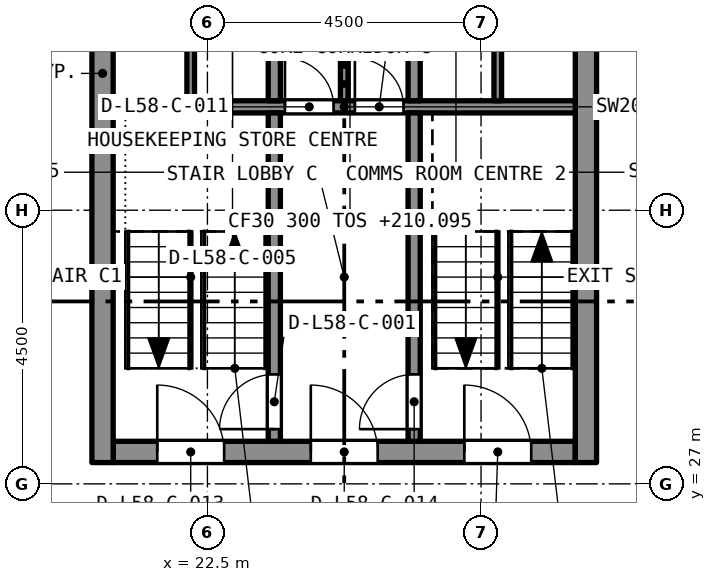
"""IFC4 building model, lengths in metres.
Left out: names, types, materials, properties, quantities, classifications, styles, units other than length and angle.
Written with IfcOpenShell. Run it as: python <this file> out.ifc"""

import sys

from ifc_helpers import new_model, si_unit, direction, frame, frame_2d, origin, place, context, subcontext, project, spatial, rectangle, extrude, element, fill, save


model = new_model("IFC4")
c1 = context("Model", 3, precision=1e-05, world=origin(), true_north=direction((0.0, 1.0)))
c2 = subcontext(c1, "Body", "Model", "MODEL_VIEW")
j1 = project(units=[si_unit("LENGTHUNIT", "METRE"), si_unit("PLANEANGLEUNIT", "RADIAN")], contexts=[c1])
p1 = place(None, origin())
s1 = spatial("IfcSite", under=j1, at=p1, CompositionType="ELEMENT")
p2 = place(p1, origin())
s2 = spatial("IfcBuilding", under=s1, at=p2, CompositionType="ELEMENT")
p3 = place(p2, frame((0.0, 0.0, 210.095)))
s3 = spatial("IfcBuildingStorey", under=s2, at=p3, CompositionType="ELEMENT", Elevation=210.095)
p4 = place(p3, frame((20.95, 27.525, 0.0), z_axis=(0.0, 0.0, 1.0), x_axis=(1.0, 0.0, 0.0)))
e1 = element("IfcWall", 1, at=p4, inside=s3, PredefinedType="SOLIDWALL", context=c2, shape_type="SweptSolid", body=[
    extrude(rectangle(XDim=7.6, YDim=0.35, at=frame_2d((3.8, 0.0))), origin(), (0.0, 0.0, 1.0), 3.2),
])
p5 = place(p4, frame((0.725, 0.0, 0.0)))
e2 = element("IfcOpeningElement", 2, at=p5, cuts=e1, PredefinedType="OPENING", context=c2, shape_type="SweptSolid", body=[
    extrude(rectangle(XDim=1.1, YDim=2.1, at=frame_2d((0.55, 1.05))), frame((0.0, 0.185, 0.0), z_axis=(0.0, -1.0, 0.0), x_axis=(1.0, 0.0, 0.0)), (0.0, 0.0, 1.0), 0.37),
])
p6 = place(p4, frame((3.25, 0.0, 0.0)))
e3 = element("IfcOpeningElement", 3, at=p6, cuts=e1, PredefinedType="OPENING", context=c2, shape_type="SweptSolid", body=[
    extrude(rectangle(XDim=1.1, YDim=2.1, at=frame_2d((0.55, 1.05))), frame((0.0, 0.185, 0.0), z_axis=(0.0, -1.0, 0.0), x_axis=(1.0, 0.0, 0.0)), (0.0, 0.0, 1.0), 0.37),
])
p7 = place(p4, frame((5.775, 0.0, 0.0)))
e4 = element("IfcOpeningElement", 4, at=p7, cuts=e1, PredefinedType="OPENING", context=c2, shape_type="SweptSolid", body=[
    extrude(rectangle(XDim=1.1, YDim=2.1, at=frame_2d((0.55, 1.05))), frame((0.0, 0.185, 0.0), z_axis=(0.0, -1.0, 0.0), x_axis=(1.0, 0.0, 0.0)), (0.0, 0.0, 1.0), 0.37),
])
p8 = place(p3, frame((20.775, 27.35, 0.0), z_axis=(0.0, 0.0, 1.0), x_axis=(0.0, 1.0, 0.0)))
e5 = element("IfcWall", 5, at=p8, inside=s3, PredefinedType="SOLIDWALL", context=c2, shape_type="SweptSolid", body=[
    extrude(rectangle(XDim=12.8, YDim=0.35, at=frame_2d((6.4, 0.0))), origin(), (0.0, 0.0, 1.0), 3.2),
])
p9 = place(p8, frame((8.6, 0.0, 0.0)))
e6 = element("IfcOpeningElement", 6, at=p9, cuts=e5, PredefinedType="OPENING", context=c2, shape_type="SweptSolid", body=[
    extrude(rectangle(XDim=1.2, YDim=2.1, at=frame_2d((0.6, 1.05))), frame((0.0, 0.185, 0.0), z_axis=(0.0, -1.0, 0.0), x_axis=(1.0, 0.0, 0.0)), (0.0, 0.0, 1.0), 0.37),
])
p10 = place(p3, frame((28.725, 27.35, 0.0), z_axis=(0.0, 0.0, 1.0), x_axis=(0.0, 1.0, 0.0)))
e7 = element("IfcWall", 7, at=p10, inside=s3, PredefinedType="SOLIDWALL", context=c2, shape_type="SweptSolid", body=[
    extrude(rectangle(XDim=12.8, YDim=0.35, at=frame_2d((6.4, 0.0))), origin(), (0.0, 0.0, 1.0), 3.2),
])
p11 = place(p10, frame((8.6, 0.0, 0.0)))
e8 = element("IfcOpeningElement", 8, at=p11, cuts=e7, PredefinedType="OPENING", context=c2, shape_type="SweptSolid", body=[
    extrude(rectangle(XDim=1.2, YDim=2.1, at=frame_2d((0.6, 1.05))), frame((0.0, 0.185, 0.0), z_axis=(0.0, -1.0, 0.0), x_axis=(1.0, 0.0, 0.0)), (0.0, 0.0, 1.0), 0.37),
])
p12 = place(p3, frame((20.95, 33.2, 0.0), z_axis=(0.0, 0.0, 1.0), x_axis=(1.0, 0.0, 0.0)))
e9 = element("IfcWall", 9, at=p12, inside=s3, PredefinedType="SOLIDWALL", context=c2, shape_type="SweptSolid", body=[
    extrude(rectangle(XDim=7.6, YDim=0.2, at=frame_2d((3.8, 0.0))), origin(), (0.0, 0.0, 1.0), 2.9),
])
p13 = place(p12, frame((2.825, 0.0, 0.0)))
e10 = element("IfcOpeningElement", 10, at=p13, cuts=e9, PredefinedType="OPENING", context=c2, shape_type="SweptSolid", body=[
    extrude(rectangle(XDim=0.8, YDim=2.1, at=frame_2d((0.4, 1.05))), frame((0.0, 0.11, 0.0), z_axis=(0.0, -1.0, 0.0), x_axis=(1.0, 0.0, 0.0)), (0.0, 0.0, 1.0), 0.22),
])
p14 = place(p12, frame((3.975, 0.0, 0.0)))
e11 = element("IfcOpeningElement", 11, at=p14, cuts=e9, PredefinedType="OPENING", context=c2, shape_type="SweptSolid", body=[
    extrude(rectangle(XDim=0.8, YDim=2.1, at=frame_2d((0.4, 1.05))), frame((0.0, 0.11, 0.0), z_axis=(0.0, -1.0, 0.0), x_axis=(1.0, 0.0, 0.0)), (0.0, 0.0, 1.0), 0.22),
])
p15 = place(p3, frame((23.6, 27.7, 0.0), z_axis=(0.0, 0.0, 1.0), x_axis=(0.0, 1.0, 0.0)))
e12 = element("IfcWall", 12, at=p15, inside=s3, PredefinedType="SOLIDWALL", context=c2, shape_type="SweptSolid", body=[
    extrude(rectangle(XDim=5.4, YDim=0.2, at=frame_2d((2.7, 0.0))), origin(), (0.0, 0.0, 1.0), 2.9),
])
p16 = place(p15, frame((0.2, 0.0, 0.0)))
e13 = element("IfcOpeningElement", 13, at=p16, cuts=e12, PredefinedType="OPENING", context=c2, shape_type="SweptSolid", body=[
    extrude(rectangle(XDim=0.9, YDim=2.1, at=frame_2d((0.45, 1.05))), frame((0.0, 0.11, 0.0), z_axis=(0.0, -1.0, 0.0), x_axis=(1.0, 0.0, 0.0)), (0.0, 0.0, 1.0), 0.22),
])
p17 = place(p3, frame((25.9, 27.7, 0.0), z_axis=(0.0, 0.0, 1.0), x_axis=(0.0, 1.0, 0.0)))
e14 = element("IfcWall", 14, at=p17, inside=s3, PredefinedType="SOLIDWALL", context=c2, shape_type="SweptSolid", body=[
    extrude(rectangle(XDim=5.4, YDim=0.2, at=frame_2d((2.7, 0.0))), origin(), (0.0, 0.0, 1.0), 2.9),
])
p18 = place(p17, frame((0.2, 0.0, 0.0)))
e15 = element("IfcOpeningElement", 15, at=p18, cuts=e14, PredefinedType="OPENING", context=c2, shape_type="SweptSolid", body=[
    extrude(rectangle(XDim=0.9, YDim=2.1, at=frame_2d((0.45, 1.05))), frame((0.0, 0.11, 0.0), z_axis=(0.0, -1.0, 0.0), x_axis=(1.0, 0.0, 0.0)), (0.0, 0.0, 1.0), 0.22),
])
for number, where, z_axis, x_axis in (
    (16, (23.6, 33.3, 0.0), (0.0, 0.0, 1.0), (0.0, 1.0, 0.0)),
    (17, (25.9, 33.3, 0.0), (0.0, 0.0, 1.0), (0.0, 1.0, 0.0)),
):
    element("IfcWall", number, at=place(p3, frame(where, z_axis=z_axis, x_axis=x_axis)), inside=s3, PredefinedType="SOLIDWALL", context=c2, shape_type="SweptSolid", body=[
        extrude(rectangle(XDim=2.3, YDim=0.2, at=frame_2d((1.15, 0.0))), origin(), (0.0, 0.0, 1.0), 2.9),
    ])
for number, where, z_axis, x_axis in (
    (18, (22.225, 33.3, 0.0), (0.0, 0.0, 1.0), (0.0, 1.0, 0.0)),
    (19, (27.275, 33.3, 0.0), (0.0, 0.0, 1.0), (0.0, 1.0, 0.0)),
    (20, (24.75, 33.3, 0.0), (0.0, 0.0, 1.0), (0.0, 1.0, 0.0)),
):
    element("IfcWall", number, at=place(p3, frame(where, z_axis=z_axis, x_axis=x_axis)), inside=s3, PredefinedType="PARTITIONING", context=c2, shape_type="SweptSolid", body=[
        extrude(rectangle(XDim=2.3, YDim=0.125, at=frame_2d((1.15, 0.0))), origin(), (0.0, 0.0, 1.0), 2.9),
    ])
p19 = place(p16, origin())
e21 = element("IfcDoor", 21, at=p19, inside=s3, OperationType="SINGLE_SWING_LEFT", PredefinedType="DOOR", context=c2, shape_type="SweptSolid", body=[
    extrude(rectangle(XDim=0.9, YDim=2.1, at=frame_2d((0.45, 1.05))), frame((0.0, 0.025, 0.0), z_axis=(0.0, -1.0, 0.0), x_axis=(1.0, 0.0, 0.0)), (0.0, 0.0, 1.0), 0.05),
])
fill(e13, e21)
p20 = place(p18, origin())
e22 = element("IfcDoor", 22, at=p20, inside=s3, OperationType="SINGLE_SWING_LEFT", PredefinedType="DOOR", context=c2, shape_type="SweptSolid", body=[
    extrude(rectangle(XDim=0.9, YDim=2.1, at=frame_2d((0.45, 1.05))), frame((0.0, 0.025, 0.0), z_axis=(0.0, -1.0, 0.0), x_axis=(1.0, 0.0, 0.0)), (0.0, 0.0, 1.0), 0.05),
])
fill(e15, e22)
p21 = place(p13, origin())
e23 = element("IfcDoor", 23, at=p21, inside=s3, OperationType="SINGLE_SWING_LEFT", PredefinedType="DOOR", context=c2, shape_type="SweptSolid", body=[
    extrude(rectangle(XDim=0.8, YDim=2.1, at=frame_2d((0.4, 1.05))), frame((0.0, 0.025, 0.0), z_axis=(0.0, -1.0, 0.0), x_axis=(1.0, 0.0, 0.0)), (0.0, 0.0, 1.0), 0.05),
])
fill(e10, e23)
p22 = place(p14, origin())
e24 = element("IfcDoor", 24, at=p22, inside=s3, OperationType="SINGLE_SWING_LEFT", PredefinedType="DOOR", context=c2, shape_type="SweptSolid", body=[
    extrude(rectangle(XDim=0.8, YDim=2.1, at=frame_2d((0.4, 1.05))), frame((0.0, 0.025, 0.0), z_axis=(0.0, -1.0, 0.0), x_axis=(1.0, 0.0, 0.0)), (0.0, 0.0, 1.0), 0.05),
])
fill(e11, e24)
p23 = place(p5, origin())
e25 = element("IfcDoor", 25, at=p23, inside=s3, OperationType="SINGLE_SWING_LEFT", PredefinedType="DOOR", context=c2, shape_type="SweptSolid", body=[
    extrude(rectangle(XDim=1.1, YDim=2.1, at=frame_2d((0.55, 1.05))), frame((0.0, 0.025, 0.0), z_axis=(0.0, -1.0, 0.0), x_axis=(1.0, 0.0, 0.0)), (0.0, 0.0, 1.0), 0.05),
])
fill(e2, e25)
p24 = place(p6, origin())
e26 = element("IfcDoor", 26, at=p24, inside=s3, OperationType="SINGLE_SWING_LEFT", PredefinedType="DOOR", context=c2, shape_type="SweptSolid", body=[
    extrude(rectangle(XDim=1.1, YDim=2.1, at=frame_2d((0.55, 1.05))), frame((0.0, 0.025, 0.0), z_axis=(0.0, -1.0, 0.0), x_axis=(1.0, 0.0, 0.0)), (0.0, 0.0, 1.0), 0.05),
])
fill(e3, e26)
p25 = place(p7, origin())
e27 = element("IfcDoor", 27, at=p25, inside=s3, OperationType="SINGLE_SWING_LEFT", PredefinedType="DOOR", context=c2, shape_type="SweptSolid", body=[
    extrude(rectangle(XDim=1.1, YDim=2.1, at=frame_2d((0.55, 1.05))), frame((0.0, 0.025, 0.0), z_axis=(0.0, -1.0, 0.0), x_axis=(1.0, 0.0, 0.0)), (0.0, 0.0, 1.0), 0.05),
])
fill(e4, e27)
save(model, sys.argv[1])
